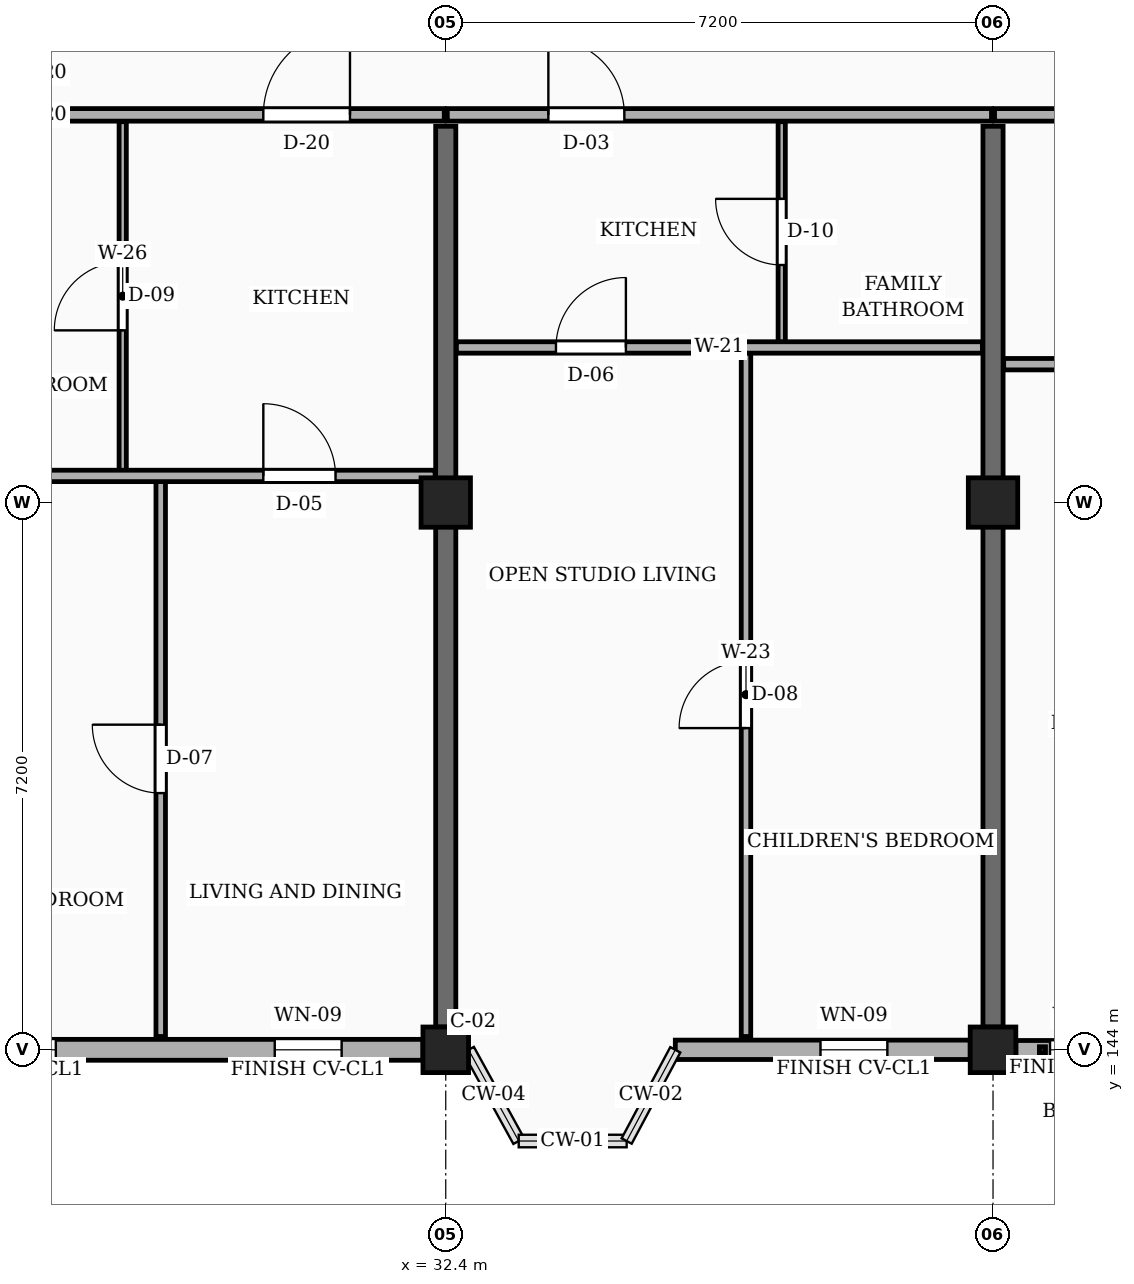
"""IFC4 building model, lengths in metres.
Left out: names, types, materials, properties, quantities, classifications, styles, units other than length and angle.
Written with IfcOpenShell. Run it as: python <this file> out.ifc"""

import sys

from ifc_helpers import new_model, si_unit, direction, frame, frame_2d, origin, origin_2d, place, context, subcontext, project, spatial, rectangle, extrude, element, fill, save


model = new_model("IFC4")
c1 = context("Model", 3, precision=1e-05, world=origin(), true_north=direction((0.0, 1.0)))
c2 = subcontext(c1, "Body", "Model", "MODEL_VIEW")
j1 = project(units=[si_unit("LENGTHUNIT", "METRE"), si_unit("PLANEANGLEUNIT", "RADIAN")], contexts=[c1])
p1 = place(None, origin())
s1 = spatial("IfcSite", under=j1, at=p1, CompositionType="ELEMENT")
p2 = place(p1, origin())
s2 = spatial("IfcBuilding", under=s1, at=p2, CompositionType="ELEMENT")
p3 = place(p2, frame((0.0, 0.0, 7.65)))
s3 = spatial("IfcBuildingStorey", under=s2, at=p3, CompositionType="ELEMENT", Elevation=7.65)
p4 = place(p3, frame((32.4, 144.0, 0.0), z_axis=(0.0, 0.0, 1.0), x_axis=(1.0, 0.0, 0.0)))
e1 = element("IfcColumn", 1, at=p4, inside=s3, PredefinedType="COLUMN", context=c2, shape_type="SweptSolid", body=[
    extrude(rectangle(XDim=0.6, YDim=0.6, at=origin_2d()), origin(), (0.0, 0.0, 1.0), 3.15),
])
p5 = place(p3, frame((32.4, 151.2, 0.0), z_axis=(0.0, 0.0, 1.0), x_axis=(1.0, 0.0, 0.0)))
e2 = element("IfcColumn", 2, at=p5, inside=s3, PredefinedType="COLUMN", context=c2, shape_type="SweptSolid", body=[
    extrude(rectangle(XDim=0.65, YDim=0.65, at=origin_2d()), origin(), (0.0, 0.0, 1.0), 3.15),
])
p6 = place(p3, frame((39.6, 144.0, 0.0), z_axis=(0.0, 0.0, 1.0), x_axis=(1.0, 0.0, 0.0)))
e3 = element("IfcColumn", 3, at=p6, inside=s3, PredefinedType="COLUMN", context=c2, shape_type="SweptSolid", body=[
    extrude(rectangle(XDim=0.6, YDim=0.6, at=origin_2d()), origin(), (0.0, 0.0, 1.0), 3.15),
])
p7 = place(p3, frame((39.6, 151.2, 0.0), z_axis=(0.0, 0.0, 1.0), x_axis=(1.0, 0.0, 0.0)))
e4 = element("IfcColumn", 4, at=p7, inside=s3, PredefinedType="COLUMN", context=c2, shape_type="SweptSolid", body=[
    extrude(rectangle(XDim=0.65, YDim=0.65, at=origin_2d()), origin(), (0.0, 0.0, 1.0), 3.15),
])
for number, where, z_axis, x_axis in (
    (5, (32.4, 144.3, 0.0), (0.0, 0.0, 1.0), (0.0, 1.0, 0.0)),
    (6, (39.6, 144.3, 0.0), (0.0, 0.0, 1.0), (0.0, 1.0, 0.0)),
):
    element("IfcWall", number, at=place(p3, frame(where, z_axis=z_axis, x_axis=x_axis)), inside=s3, PredefinedType="SOLIDWALL", context=c2, shape_type="SweptSolid", body=[
        extrude(rectangle(XDim=11.85, YDim=0.265, at=frame_2d((5.925, 0.0))), origin(), (0.0, 0.0, 1.0), 2.185),
    ])
p8 = place(p3, frame((25.5, 144.0, 0.0), z_axis=(0.0, 0.0, 1.0), x_axis=(1.0, 0.0, 0.0)))
e7 = element("IfcWall", 7, at=p8, inside=s3, PredefinedType="SOLIDWALL", context=c2, shape_type="SweptSolid", body=[
    extrude(rectangle(XDim=6.6, YDim=0.275, at=frame_2d((3.3, 0.0))), origin(), (0.0, 0.0, 1.0), 2.455),
])
p9 = place(p8, frame((0.45, 0.0, 0.78)))
e8 = element("IfcOpeningElement", 8, at=p9, cuts=e7, PredefinedType="OPENING", context=c2, shape_type="SweptSolid", body=[
    extrude(rectangle(XDim=1.32, YDim=1.15, at=frame_2d((0.66, 0.575))), frame((0.0, 0.147, 0.0), z_axis=(0.0, -1.0, 0.0), x_axis=(1.0, 0.0, 0.0)), (0.0, 0.0, 1.0), 0.295),
])
p10 = place(p8, frame((4.65, 0.0, 0.78)))
e9 = element("IfcOpeningElement", 9, at=p10, cuts=e7, PredefinedType="OPENING", context=c2, shape_type="SweptSolid", body=[
    extrude(rectangle(XDim=0.88, YDim=1.26, at=frame_2d((0.44, 0.63))), frame((0.0, 0.147, 0.0), z_axis=(0.0, -1.0, 0.0), x_axis=(1.0, 0.0, 0.0)), (0.0, 0.0, 1.0), 0.295),
])
p11 = place(p3, frame((35.42, 144.0, 0.0), z_axis=(0.0, 0.0, 1.0), x_axis=(1.0, 0.0, 0.0)))
e10 = element("IfcWall", 10, at=p11, inside=s3, PredefinedType="SOLIDWALL", context=c2, shape_type="SweptSolid", body=[
    extrude(rectangle(XDim=3.88, YDim=0.255, at=frame_2d((1.94, 0.0))), origin(), (0.0, 0.0, 1.0), 2.455),
])
p12 = place(p11, frame((1.91, 0.0, 0.78)))
e11 = element("IfcOpeningElement", 11, at=p12, cuts=e10, PredefinedType="OPENING", context=c2, shape_type="SweptSolid", body=[
    extrude(rectangle(XDim=0.88, YDim=1.26, at=frame_2d((0.44, 0.63))), frame((0.0, 0.137, 0.0), z_axis=(0.0, -1.0, 0.0), x_axis=(1.0, 0.0, 0.0)), (0.0, 0.0, 1.0), 0.275),
])
p13 = place(p3, frame((39.9, 144.0, 0.0), z_axis=(0.0, 0.0, 1.0), x_axis=(1.0, 0.0, 0.0)))
e12 = element("IfcWall", 12, at=p13, inside=s3, PredefinedType="SOLIDWALL", context=c2, shape_type="SweptSolid", body=[
    extrude(rectangle(XDim=6.6, YDim=0.245, at=frame_2d((3.3, 0.0))), origin(), (0.0, 0.0, 1.0), 2.455),
])
p14 = place(p13, frame((0.45, 0.0, 0.78)))
e13 = element("IfcOpeningElement", 13, at=p14, cuts=e12, PredefinedType="OPENING", context=c2, shape_type="SweptSolid", body=[
    extrude(rectangle(XDim=0.96, YDim=1.26, at=frame_2d((0.48, 0.63))), frame((0.0, 0.133, 0.0), z_axis=(0.0, -1.0, 0.0), x_axis=(1.0, 0.0, 0.0)), (0.0, 0.0, 1.0), 0.265),
])
p15 = place(p13, frame((4.65, 0.0, 0.78)))
e14 = element("IfcOpeningElement", 14, at=p15, cuts=e12, PredefinedType="OPENING", context=c2, shape_type="SweptSolid", body=[
    extrude(rectangle(XDim=1.12, YDim=1.26, at=frame_2d((0.56, 0.63))), frame((0.0, 0.133, 0.0), z_axis=(0.0, -1.0, 0.0), x_axis=(1.0, 0.0, 0.0)), (0.0, 0.0, 1.0), 0.265),
])
p16 = place(p3, frame((25.22, 156.3, 0.0), z_axis=(0.0, 0.0, 1.0), x_axis=(1.0, 0.0, 0.0)))
e15 = element("IfcWall", 15, at=p16, inside=s3, PredefinedType="PARTITIONING", context=c2, shape_type="SweptSolid", body=[
    extrude(rectangle(XDim=7.16, YDim=0.165, at=frame_2d((3.58, 0.0))), origin(), (0.0, 0.0, 1.0), 2.32),
])
p17 = place(p16, frame((4.78, 0.0, 0.0)))
e16 = element("IfcOpeningElement", 16, at=p17, cuts=e15, PredefinedType="OPENING", context=c2, shape_type="SweptSolid", body=[
    extrude(rectangle(XDim=1.14, YDim=2.18, at=frame_2d((0.57, 1.09))), frame((0.0, 0.093, 0.0), z_axis=(0.0, -1.0, 0.0), x_axis=(1.0, 0.0, 0.0)), (0.0, 0.0, 1.0), 0.185),
])
p18 = place(p3, frame((32.42, 156.3, 0.0), z_axis=(0.0, 0.0, 1.0), x_axis=(1.0, 0.0, 0.0)))
e17 = element("IfcWall", 17, at=p18, inside=s3, PredefinedType="PARTITIONING", context=c2, shape_type="SweptSolid", body=[
    extrude(rectangle(XDim=7.16, YDim=0.165, at=frame_2d((3.58, 0.0))), origin(), (0.0, 0.0, 1.0), 2.32),
])
p19 = place(p18, frame((1.33, 0.0, 0.0)))
e18 = element("IfcOpeningElement", 18, at=p19, cuts=e17, PredefinedType="OPENING", context=c2, shape_type="SweptSolid", body=[
    extrude(rectangle(XDim=1.0, YDim=2.15, at=frame_2d((0.5, 1.075))), frame((0.0, 0.093, 0.0), z_axis=(0.0, -1.0, 0.0), x_axis=(1.0, 0.0, 0.0)), (0.0, 0.0, 1.0), 0.185),
])
p20 = place(p3, frame((39.62, 156.3, 0.0), z_axis=(0.0, 0.0, 1.0), x_axis=(1.0, 0.0, 0.0)))
e19 = element("IfcWall", 19, at=p20, inside=s3, PredefinedType="PARTITIONING", context=c2, shape_type="SweptSolid", body=[
    extrude(rectangle(XDim=7.16, YDim=0.165, at=frame_2d((3.58, 0.0))), origin(), (0.0, 0.0, 1.0), 2.32),
])
p21 = place(p20, frame((1.33, 0.0, 0.0)))
e20 = element("IfcOpeningElement", 20, at=p21, cuts=e19, PredefinedType="OPENING", context=c2, shape_type="SweptSolid", body=[
    extrude(rectangle(XDim=0.94, YDim=2.12, at=frame_2d((0.47, 1.06))), frame((0.0, 0.093, 0.0), z_axis=(0.0, -1.0, 0.0), x_axis=(1.0, 0.0, 0.0)), (0.0, 0.0, 1.0), 0.185),
])
p22 = place(p3, frame((28.65, 144.175, 0.0), z_axis=(0.0, 0.0, 1.0), x_axis=(0.0, 1.0, 0.0)))
e21 = element("IfcWall", 21, at=p22, inside=s3, PredefinedType="PARTITIONING", context=c2, shape_type="SweptSolid", body=[
    extrude(rectangle(XDim=7.305, YDim=0.125, at=frame_2d((3.652, 0.0))), origin(), (0.0, 0.0, 1.0), 2.32),
])
p23 = place(p22, frame((3.202, 0.0, 0.0)))
e22 = element("IfcOpeningElement", 22, at=p23, cuts=e21, PredefinedType="OPENING", context=c2, shape_type="SweptSolid", body=[
    extrude(rectangle(XDim=0.9, YDim=2.1, at=frame_2d((0.45, 1.05))), frame((0.0, 0.073, 0.0), z_axis=(0.0, -1.0, 0.0), x_axis=(1.0, 0.0, 0.0)), (0.0, 0.0, 1.0), 0.145),
])
p24 = place(p3, frame((28.15, 151.62, 0.0), z_axis=(0.0, 0.0, 1.0), x_axis=(0.0, 1.0, 0.0)))
e23 = element("IfcWall", 23, at=p24, inside=s3, PredefinedType="PARTITIONING", context=c2, shape_type="SweptSolid", body=[
    extrude(rectangle(XDim=4.59, YDim=0.095, at=frame_2d((2.295, 0.0))), origin(), (0.0, 0.0, 1.0), 2.32),
])
p25 = place(p24, frame((1.845, 0.0, 0.0)))
e24 = element("IfcOpeningElement", 24, at=p25, cuts=e23, PredefinedType="OPENING", context=c2, shape_type="SweptSolid", body=[
    extrude(rectangle(XDim=0.9, YDim=2.05, at=frame_2d((0.45, 1.025))), frame((0.0, 0.058, 0.0), z_axis=(0.0, -1.0, 0.0), x_axis=(1.0, 0.0, 0.0)), (0.0, 0.0, 1.0), 0.115),
])
p26 = place(p3, frame((25.34, 151.55, 0.0), z_axis=(0.0, 0.0, 1.0), x_axis=(1.0, 0.0, 0.0)))
e25 = element("IfcWall", 25, at=p26, inside=s3, PredefinedType="PARTITIONING", context=c2, shape_type="SweptSolid", body=[
    extrude(rectangle(XDim=6.92, YDim=0.15, at=frame_2d((3.46, 0.0))), origin(), (0.0, 0.0, 1.0), 2.32),
])
p27 = place(p26, frame((4.66, 0.0, 0.0)))
e26 = element("IfcOpeningElement", 26, at=p27, cuts=e25, PredefinedType="OPENING", context=c2, shape_type="SweptSolid", body=[
    extrude(rectangle(XDim=0.95, YDim=2.1, at=frame_2d((0.475, 1.05))), frame((0.0, 0.085, 0.0), z_axis=(0.0, -1.0, 0.0), x_axis=(1.0, 0.0, 0.0)), (0.0, 0.0, 1.0), 0.17),
])
p28 = place(p3, frame((36.35, 144.175, 0.0), z_axis=(0.0, 0.0, 1.0), x_axis=(0.0, 1.0, 0.0)))
e27 = element("IfcWall", 27, at=p28, inside=s3, PredefinedType="PARTITIONING", context=c2, shape_type="SweptSolid", body=[
    extrude(rectangle(XDim=8.995, YDim=0.125, at=frame_2d((4.498, 0.0))), origin(), (0.0, 0.0, 1.0), 2.32),
])
p29 = place(p28, frame((4.058, 0.0, 0.0)))
e28 = element("IfcOpeningElement", 28, at=p29, cuts=e27, PredefinedType="OPENING", context=c2, shape_type="SweptSolid", body=[
    extrude(rectangle(XDim=0.88, YDim=2.08, at=frame_2d((0.44, 1.04))), frame((0.0, 0.073, 0.0), z_axis=(0.0, -1.0, 0.0), x_axis=(1.0, 0.0, 0.0)), (0.0, 0.0, 1.0), 0.145),
])
p30 = place(p3, frame((36.82, 153.31, 0.0), z_axis=(0.0, 0.0, 1.0), x_axis=(0.0, 1.0, 0.0)))
e29 = element("IfcWall", 29, at=p30, inside=s3, PredefinedType="PARTITIONING", context=c2, shape_type="SweptSolid", body=[
    extrude(rectangle(XDim=2.9, YDim=0.095, at=frame_2d((1.45, 0.0))), origin(), (0.0, 0.0, 1.0), 2.32),
])
p31 = place(p30, frame((1.015, 0.0, 0.0)))
e30 = element("IfcOpeningElement", 30, at=p31, cuts=e29, PredefinedType="OPENING", context=c2, shape_type="SweptSolid", body=[
    extrude(rectangle(XDim=0.87, YDim=2.05, at=frame_2d((0.435, 1.025))), frame((0.0, 0.058, 0.0), z_axis=(0.0, -1.0, 0.0), x_axis=(1.0, 0.0, 0.0)), (0.0, 0.0, 1.0), 0.115),
])
p32 = place(p3, frame((32.54, 153.24, 0.0), z_axis=(0.0, 0.0, 1.0), x_axis=(1.0, 0.0, 0.0)))
e31 = element("IfcWall", 31, at=p32, inside=s3, PredefinedType="PARTITIONING", context=c2, shape_type="SweptSolid", body=[
    extrude(rectangle(XDim=6.92, YDim=0.15, at=frame_2d((3.46, 0.0))), origin(), (0.0, 0.0, 1.0), 2.32),
])
p33 = place(p32, frame((1.31, 0.0, 0.0)))
e32 = element("IfcOpeningElement", 32, at=p33, cuts=e31, PredefinedType="OPENING", context=c2, shape_type="SweptSolid", body=[
    extrude(rectangle(XDim=0.92, YDim=2.1, at=frame_2d((0.46, 1.05))), frame((0.0, 0.085, 0.0), z_axis=(0.0, -1.0, 0.0), x_axis=(1.0, 0.0, 0.0)), (0.0, 0.0, 1.0), 0.17),
])
p34 = place(p3, frame((39.74, 153.02, 0.0), z_axis=(0.0, 0.0, 1.0), x_axis=(1.0, 0.0, 0.0)))
e33 = element("IfcWall", 33, at=p34, inside=s3, PredefinedType="PARTITIONING", context=c2, shape_type="SweptSolid", body=[
    extrude(rectangle(XDim=6.92, YDim=0.15, at=frame_2d((3.46, 0.0))), origin(), (0.0, 0.0, 1.0), 2.32),
])
p35 = place(p34, frame((1.31, 0.0, 0.0)))
e34 = element("IfcOpeningElement", 34, at=p35, cuts=e33, PredefinedType="OPENING", context=c2, shape_type="SweptSolid", body=[
    extrude(rectangle(XDim=0.95, YDim=2.1, at=frame_2d((0.475, 1.05))), frame((0.0, 0.085, 0.0), z_axis=(0.0, -1.0, 0.0), x_axis=(1.0, 0.0, 0.0)), (0.0, 0.0, 1.0), 0.17),
])
p36 = place(p9, origin())
e35 = element("IfcWindow", 35, at=p36, inside=s3, PartitioningType="SINGLE_PANEL", PredefinedType="WINDOW", context=c2, shape_type="SweptSolid", body=[
    extrude(rectangle(XDim=1.32, YDim=1.15, at=frame_2d((0.66, 0.575))), frame((0.0, 0.03, 0.0), z_axis=(0.0, -1.0, 0.0), x_axis=(1.0, 0.0, 0.0)), (0.0, 0.0, 1.0), 0.06),
])
fill(e8, e35)
p37 = place(p10, origin())
e36 = element("IfcWindow", 36, at=p37, inside=s3, PartitioningType="SINGLE_PANEL", PredefinedType="WINDOW", context=c2, shape_type="SweptSolid", body=[
    extrude(rectangle(XDim=0.88, YDim=1.26, at=frame_2d((0.44, 0.63))), frame((0.0, 0.03, 0.0), z_axis=(0.0, -1.0, 0.0), x_axis=(1.0, 0.0, 0.0)), (0.0, 0.0, 1.0), 0.06),
])
fill(e9, e36)
p38 = place(p12, origin())
e37 = element("IfcWindow", 37, at=p38, inside=s3, PartitioningType="SINGLE_PANEL", PredefinedType="WINDOW", context=c2, shape_type="SweptSolid", body=[
    extrude(rectangle(XDim=0.88, YDim=1.26, at=frame_2d((0.44, 0.63))), frame((0.0, 0.03, 0.0), z_axis=(0.0, -1.0, 0.0), x_axis=(1.0, 0.0, 0.0)), (0.0, 0.0, 1.0), 0.06),
])
fill(e11, e37)
p39 = place(p14, origin())
e38 = element("IfcWindow", 38, at=p39, inside=s3, PartitioningType="SINGLE_PANEL", PredefinedType="WINDOW", context=c2, shape_type="SweptSolid", body=[
    extrude(rectangle(XDim=0.96, YDim=1.26, at=frame_2d((0.48, 0.63))), frame((0.0, 0.03, 0.0), z_axis=(0.0, -1.0, 0.0), x_axis=(1.0, 0.0, 0.0)), (0.0, 0.0, 1.0), 0.06),
])
fill(e13, e38)
p40 = place(p17, origin())
e39 = element("IfcDoor", 39, at=p40, inside=s3, OperationType="SINGLE_SWING_RIGHT", PredefinedType="DOOR", context=c2, shape_type="SweptSolid", body=[
    extrude(rectangle(XDim=1.14, YDim=2.18, at=frame_2d((0.57, 1.09))), frame((0.0, 0.025, 0.0), z_axis=(0.0, -1.0, 0.0), x_axis=(1.0, 0.0, 0.0)), (0.0, 0.0, 1.0), 0.05),
])
fill(e16, e39)
p41 = place(p19, origin())
e40 = element("IfcDoor", 40, at=p41, inside=s3, OperationType="SINGLE_SWING_LEFT", PredefinedType="DOOR", context=c2, shape_type="SweptSolid", body=[
    extrude(rectangle(XDim=1.0, YDim=2.15, at=frame_2d((0.5, 1.075))), frame((0.0, 0.025, 0.0), z_axis=(0.0, -1.0, 0.0), x_axis=(1.0, 0.0, 0.0)), (0.0, 0.0, 1.0), 0.05),
])
fill(e18, e40)
p42 = place(p23, origin())
e41 = element("IfcDoor", 41, at=p42, inside=s3, OperationType="SINGLE_SWING_RIGHT", PredefinedType="DOOR", context=c2, shape_type="SweptSolid", body=[
    extrude(rectangle(XDim=0.9, YDim=2.1, at=frame_2d((0.45, 1.05))), frame((0.0, 0.025, 0.0), z_axis=(0.0, -1.0, 0.0), x_axis=(1.0, 0.0, 0.0)), (0.0, 0.0, 1.0), 0.05),
])
fill(e22, e41)
p43 = place(p25, origin())
e42 = element("IfcDoor", 42, at=p43, inside=s3, OperationType="SINGLE_SWING_LEFT", PredefinedType="DOOR", context=c2, shape_type="SweptSolid", body=[
    extrude(rectangle(XDim=0.9, YDim=2.05, at=frame_2d((0.45, 1.025))), frame((0.0, 0.025, 0.0), z_axis=(0.0, -1.0, 0.0), x_axis=(1.0, 0.0, 0.0)), (0.0, 0.0, 1.0), 0.05),
])
fill(e24, e42)
p44 = place(p27, origin())
e43 = element("IfcDoor", 43, at=p44, inside=s3, OperationType="SINGLE_SWING_LEFT", PredefinedType="DOOR", context=c2, shape_type="SweptSolid", body=[
    extrude(rectangle(XDim=0.95, YDim=2.1, at=frame_2d((0.475, 1.05))), frame((0.0, 0.025, 0.0), z_axis=(0.0, -1.0, 0.0), x_axis=(1.0, 0.0, 0.0)), (0.0, 0.0, 1.0), 0.05),
])
fill(e26, e43)
p45 = place(p29, origin())
e44 = element("IfcDoor", 44, at=p45, inside=s3, OperationType="SINGLE_SWING_LEFT", PredefinedType="DOOR", context=c2, shape_type="SweptSolid", body=[
    extrude(rectangle(XDim=0.88, YDim=2.08, at=frame_2d((0.44, 1.04))), frame((0.0, 0.025, 0.0), z_axis=(0.0, -1.0, 0.0), x_axis=(1.0, 0.0, 0.0)), (0.0, 0.0, 1.0), 0.05),
])
fill(e28, e44)
p46 = place(p31, origin())
e45 = element("IfcDoor", 45, at=p46, inside=s3, OperationType="SINGLE_SWING_RIGHT", PredefinedType="DOOR", context=c2, shape_type="SweptSolid", body=[
    extrude(rectangle(XDim=0.87, YDim=2.05, at=frame_2d((0.435, 1.025))), frame((0.0, 0.025, 0.0), z_axis=(0.0, -1.0, 0.0), x_axis=(1.0, 0.0, 0.0)), (0.0, 0.0, 1.0), 0.05),
])
fill(e30, e45)
p47 = place(p33, origin())
e46 = element("IfcDoor", 46, at=p47, inside=s3, OperationType="SINGLE_SWING_RIGHT", PredefinedType="DOOR", context=c2, shape_type="SweptSolid", body=[
    extrude(rectangle(XDim=0.92, YDim=2.1, at=frame_2d((0.46, 1.05))), frame((0.0, 0.025, 0.0), z_axis=(0.0, -1.0, 0.0), x_axis=(1.0, 0.0, 0.0)), (0.0, 0.0, 1.0), 0.05),
])
fill(e32, e46)
save(model, sys.argv[1])
